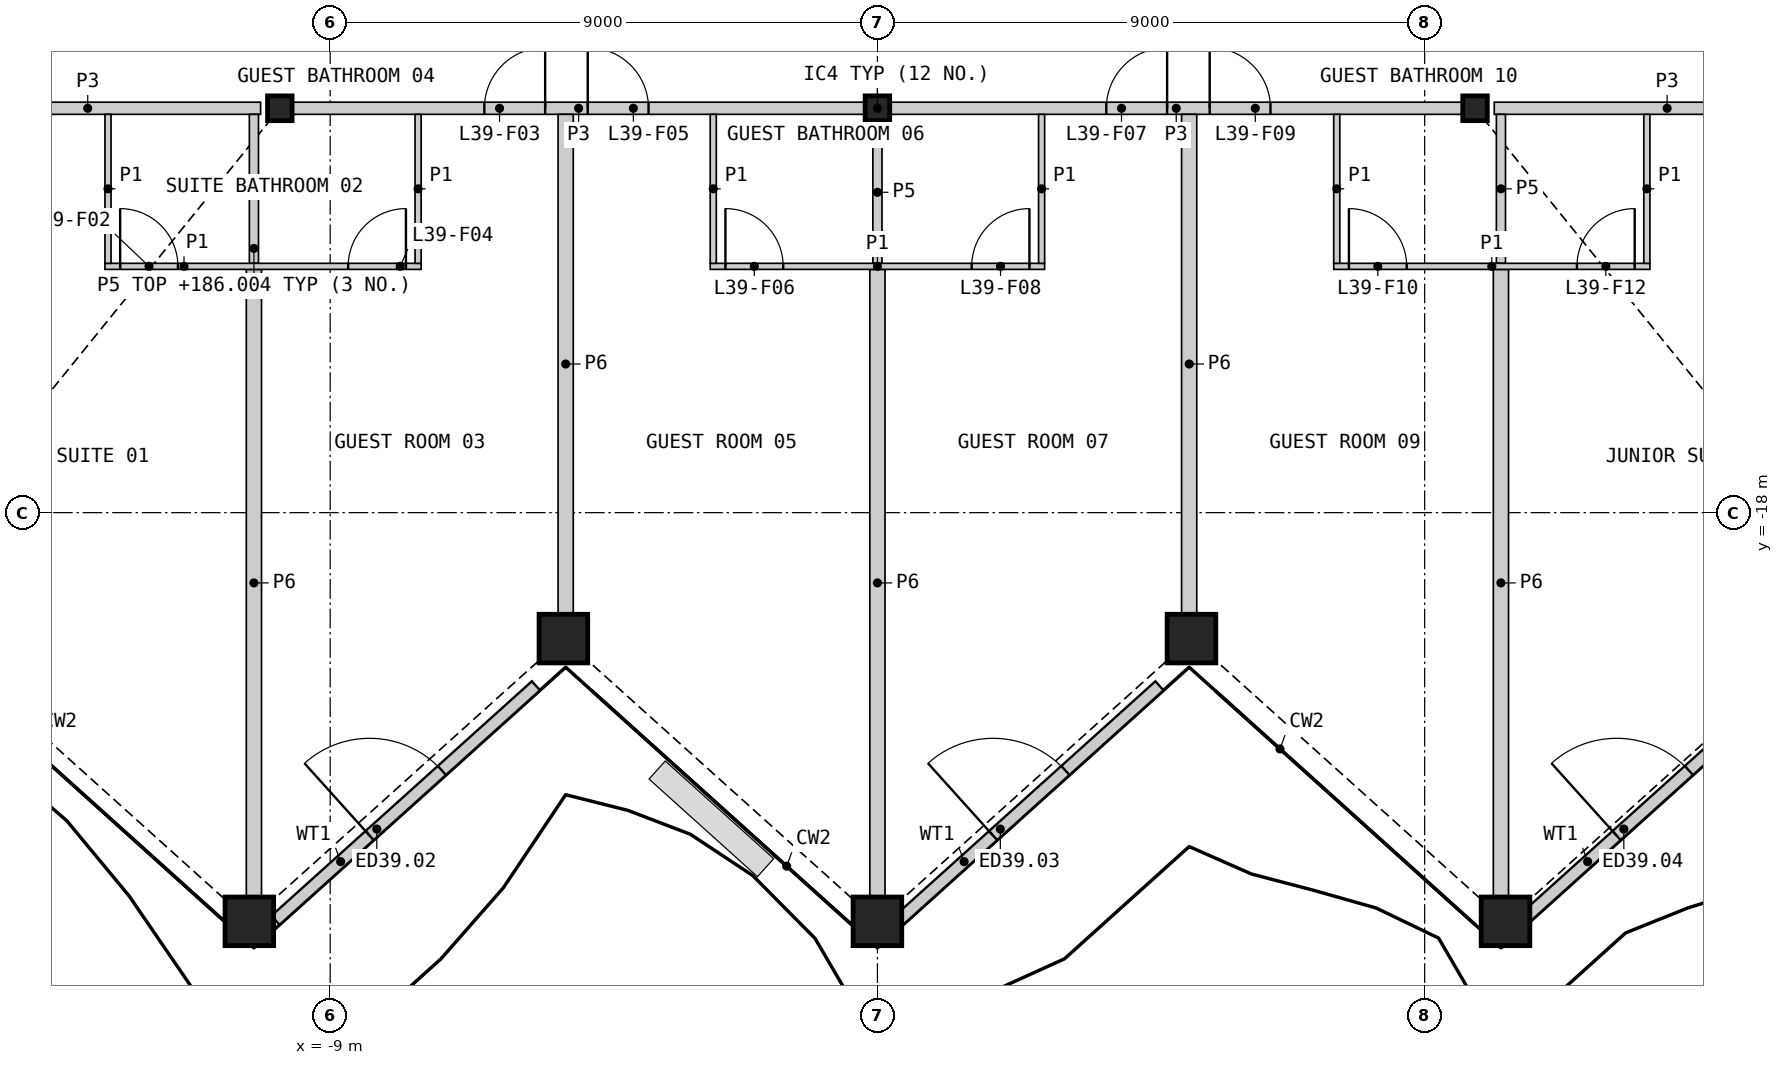
"""IFC4 building model, lengths in metres.
Left out: names, types, materials, properties, quantities, classifications, styles, units other than length and angle.
Written with IfcOpenShell. Run it as: python <this file> out.ifc"""

import sys

from ifc_helpers import new_model, si_unit, direction, frame, frame_2d, origin, origin_2d, place, context, subcontext, project, spatial, rectangle, hollow_rectangle, i_section, extrude, element, fill, save


model = new_model("IFC4")
c1 = context("Model", 3, precision=1e-05, world=origin(), true_north=direction((0.0, 1.0)))
c2 = subcontext(c1, "Body", "Model", "MODEL_VIEW")
j1 = project(units=[si_unit("LENGTHUNIT", "METRE"), si_unit("PLANEANGLEUNIT", "RADIAN")], contexts=[c1])
p1 = place(None, origin())
s1 = spatial("IfcSite", under=j1, at=p1, CompositionType="ELEMENT")
p2 = place(p1, origin())
s2 = spatial("IfcBuilding", under=s1, at=p2, CompositionType="ELEMENT")
p3 = place(p2, frame((0.0, 0.0, 183.6)))
s3 = spatial("IfcBuildingStorey", under=s2, at=p3, CompositionType="ELEMENT", Elevation=183.6)
for number, where, z_axis, x_axis in (
    (1, (-10.329, -24.722, 0.0), (0.0, 0.0, 1.0), (1.0, 0.0, 0.0)),
    (2, (-5.165, -20.071, 0.0), (0.0, 0.0, 1.0), (1.0, 0.0, 0.0)),
    (3, (0.0, -24.722, 0.0), (0.0, 0.0, 1.0), (1.0, 0.0, 0.0)),
    (4, (5.165, -20.071, 0.0), (0.0, 0.0, 1.0), (1.0, 0.0, 0.0)),
    (5, (10.329, -24.722, 0.0), (0.0, 0.0, 1.0), (1.0, 0.0, 0.0)),
):
    element("IfcColumn", number, at=place(p3, frame(where, z_axis=z_axis, x_axis=x_axis)), inside=s3, PredefinedType="COLUMN", context=c2, shape_type="SweptSolid", body=[
        extrude(hollow_rectangle(XDim=0.8, YDim=0.8, WallThickness=0.05, at=origin_2d()), origin(), (0.0, 0.0, 1.0), 3.6),
    ])
for number, where, z_axis, x_axis in (
    (6, (-9.828, -11.349, 0.0), (0.0, 0.0, 1.0), (1.0, 0.0, 0.0)),
    (7, (0.0, -11.349, 0.0), (0.0, 0.0, 1.0), (1.0, 0.0, 0.0)),
    (8, (9.828, -11.349, 0.0), (0.0, 0.0, 1.0), (1.0, 0.0, 0.0)),
):
    element("IfcColumn", number, at=place(p3, frame(where, z_axis=z_axis, x_axis=x_axis)), inside=s3, PredefinedType="COLUMN", context=c2, shape_type="SweptSolid", body=[
        extrude(i_section(OverallWidth=0.404, OverallDepth=0.407, WebThickness=0.027, FlangeThickness=0.044, at=origin_2d()), origin(), (0.0, 0.0, 1.0), 3.6),
    ])
p4 = place(p3, frame((-9.899, -24.704, 0.0), z_axis=(0.0, 0.0, 1.0), x_axis=(0.74312139518, 0.669156627424, 0.0)))
e9 = element("IfcWall", 9, at=p4, inside=s3, PredefinedType="SOLIDWALL", context=c2, shape_type="SweptSolid", body=[
    extrude(rectangle(XDim=5.763, YDim=0.2, at=frame_2d((2.882, 0.0))), origin(), (0.0, 0.0, 1.0), 2.701),
])
p5 = place(p4, frame((2.082, 0.0, 0.0)))
e10 = element("IfcOpeningElement", 10, at=p5, cuts=e9, PredefinedType="OPENING", context=c2, shape_type="SweptSolid", body=[
    extrude(rectangle(XDim=1.6, YDim=2.4, at=frame_2d((0.8, 1.2))), frame((0.0, 0.11, 0.0), z_axis=(0.0, -1.0, 0.0), x_axis=(1.0, 0.0, 0.0)), (0.0, 0.0, 1.0), 0.22),
])
p6 = place(p3, frame((0.355, -24.704, 0.0), z_axis=(0.0, 0.0, 1.0), x_axis=(0.743140362926, 0.669135562491, 0.0)))
e11 = element("IfcWall", 11, at=p6, inside=s3, PredefinedType="SOLIDWALL", context=c2, shape_type="SweptSolid", body=[
    extrude(rectangle(XDim=5.763, YDim=0.2, at=frame_2d((2.882, 0.0))), origin(), (0.0, 0.0, 1.0), 2.701),
])
p7 = place(p6, frame((2.082, 0.0, 0.0)))
e12 = element("IfcOpeningElement", 12, at=p7, cuts=e11, PredefinedType="OPENING", context=c2, shape_type="SweptSolid", body=[
    extrude(rectangle(XDim=1.6, YDim=2.4, at=frame_2d((0.8, 1.2))), frame((0.0, 0.11, 0.0), z_axis=(0.0, -1.0, 0.0), x_axis=(1.0, 0.0, 0.0)), (0.0, 0.0, 1.0), 0.22),
])
p8 = place(p3, frame((10.609, -24.704, 0.0), z_axis=(0.0, 0.0, 1.0), x_axis=(0.743140362926, 0.669135562491, 0.0)))
e13 = element("IfcWall", 13, at=p8, inside=s3, PredefinedType="SOLIDWALL", context=c2, shape_type="SweptSolid", body=[
    extrude(rectangle(XDim=5.763, YDim=0.2, at=frame_2d((2.882, 0.0))), origin(), (0.0, 0.0, 1.0), 2.701),
])
p9 = place(p8, frame((2.082, 0.0, 0.0)))
e14 = element("IfcOpeningElement", 14, at=p9, cuts=e13, PredefinedType="OPENING", context=c2, shape_type="SweptSolid", body=[
    extrude(rectangle(XDim=1.6, YDim=2.4, at=frame_2d((0.8, 1.2))), frame((0.0, 0.11, 0.0), z_axis=(0.0, -1.0, 0.0), x_axis=(1.0, 0.0, 0.0)), (0.0, 0.0, 1.0), 0.22),
])
for number, where, z_axis, x_axis in (
    (15, (-10.254, -24.312, 0.0), (0.0, 0.0, 1.0), (0.0, 1.0, 0.0)),
    (16, (0.0, -24.312, 0.0), (0.0, 0.0, 1.0), (0.0, 1.0, 0.0)),
    (17, (10.254, -24.312, 0.0), (0.0, 0.0, 1.0), (0.0, 1.0, 0.0)),
):
    element("IfcWall", number, at=place(p3, frame(where, z_axis=z_axis, x_axis=x_axis)), inside=s3, PredefinedType="PARTITIONING", context=c2, shape_type="SweptSolid", body=[
        extrude(rectangle(XDim=10.313, YDim=0.25, at=frame_2d((5.156, 0.0))), origin(), (0.0, 0.0, 1.0), 2.404),
    ])
p10 = place(p3, frame((-9.615, -11.349, 0.0), z_axis=(0.0, 0.0, 1.0), x_axis=(1.0, 0.0, 0.0)))
e18 = element("IfcWall", 18, at=p10, inside=s3, PredefinedType="PARTITIONING", context=c2, shape_type="SweptSolid", body=[
    extrude(rectangle(XDim=9.401, YDim=0.2, at=frame_2d((4.701, 0.0))), origin(), (0.0, 0.0, 1.0), 3.25),
])
p11 = place(p10, frame((3.15, 0.0, 0.0)))
e19 = element("IfcOpeningElement", 19, at=p11, cuts=e18, PredefinedType="OPENING", context=c2, shape_type="SweptSolid", body=[
    extrude(rectangle(XDim=1.0, YDim=2.1, at=frame_2d((0.5, 1.05))), frame((0.0, 0.11, 0.0), z_axis=(0.0, -1.0, 0.0), x_axis=(1.0, 0.0, 0.0)), (0.0, 0.0, 1.0), 0.22),
])
p12 = place(p10, frame((4.851, 0.0, 0.0)))
e20 = element("IfcOpeningElement", 20, at=p12, cuts=e18, PredefinedType="OPENING", context=c2, shape_type="SweptSolid", body=[
    extrude(rectangle(XDim=1.0, YDim=2.1, at=frame_2d((0.5, 1.05))), frame((0.0, 0.11, 0.0), z_axis=(0.0, -1.0, 0.0), x_axis=(1.0, 0.0, 0.0)), (0.0, 0.0, 1.0), 0.22),
])
p13 = place(p3, frame((0.214, -11.349, 0.0), z_axis=(0.0, 0.0, 1.0), x_axis=(1.0, 0.0, 0.0)))
e21 = element("IfcWall", 21, at=p13, inside=s3, PredefinedType="PARTITIONING", context=c2, shape_type="SweptSolid", body=[
    extrude(rectangle(XDim=9.401, YDim=0.2, at=frame_2d((4.701, 0.0))), origin(), (0.0, 0.0, 1.0), 3.25),
])
p14 = place(p13, frame((3.551, 0.0, 0.0)))
e22 = element("IfcOpeningElement", 22, at=p14, cuts=e21, PredefinedType="OPENING", context=c2, shape_type="SweptSolid", body=[
    extrude(rectangle(XDim=1.0, YDim=2.1, at=frame_2d((0.5, 1.05))), frame((0.0, 0.11, 0.0), z_axis=(0.0, -1.0, 0.0), x_axis=(1.0, 0.0, 0.0)), (0.0, 0.0, 1.0), 0.22),
])
p15 = place(p13, frame((5.251, 0.0, 0.0)))
e23 = element("IfcOpeningElement", 23, at=p15, cuts=e21, PredefinedType="OPENING", context=c2, shape_type="SweptSolid", body=[
    extrude(rectangle(XDim=1.0, YDim=2.1, at=frame_2d((0.5, 1.05))), frame((0.0, 0.11, 0.0), z_axis=(0.0, -1.0, 0.0), x_axis=(1.0, 0.0, 0.0)), (0.0, 0.0, 1.0), 0.22),
])
for number, where, z_axis, x_axis in (
    (24, (-5.127, -19.661, 0.0), (0.0, 0.0, 1.0), (0.0, 1.0, 0.0)),
    (25, (5.127, -19.661, 0.0), (0.0, 0.0, 1.0), (0.0, 1.0, 0.0)),
):
    element("IfcWall", number, at=place(p3, frame(where, z_axis=z_axis, x_axis=x_axis)), inside=s3, PredefinedType="PARTITIONING", context=c2, shape_type="SweptSolid", body=[
        extrude(rectangle(XDim=8.212, YDim=0.25, at=frame_2d((4.106, 0.0))), origin(), (0.0, 0.0, 1.0), 2.404),
    ])
p16 = place(p3, frame((-15.831, -11.349, 0.0), z_axis=(0.0, 0.0, 1.0), x_axis=(1.0, 0.0, 0.0)))
e26 = element("IfcWall", 26, at=p16, inside=s3, PredefinedType="PARTITIONING", context=c2, shape_type="SweptSolid", body=[
    extrude(rectangle(XDim=5.687, YDim=0.2, at=frame_2d((2.843, 0.0))), origin(), (0.0, 0.0, 1.0), 3.25),
])
p17 = place(p16, frame((0.352, 0.0, 0.0)))
e27 = element("IfcOpeningElement", 27, at=p17, cuts=e26, PredefinedType="OPENING", context=c2, shape_type="SweptSolid", body=[
    extrude(rectangle(XDim=1.1, YDim=2.1, at=frame_2d((0.55, 1.05))), frame((0.0, 0.11, 0.0), z_axis=(0.0, -1.0, 0.0), x_axis=(1.0, 0.0, 0.0)), (0.0, 0.0, 1.0), 0.22),
])
p18 = place(p3, frame((10.144, -11.349, 0.0), z_axis=(0.0, 0.0, 1.0), x_axis=(1.0, 0.0, 0.0)))
e28 = element("IfcWall", 28, at=p18, inside=s3, PredefinedType="PARTITIONING", context=c2, shape_type="SweptSolid", body=[
    extrude(rectangle(XDim=5.687, YDim=0.2, at=frame_2d((2.843, 0.0))), origin(), (0.0, 0.0, 1.0), 3.25),
])
p19 = place(p18, frame((4.235, 0.0, 0.0)))
e29 = element("IfcOpeningElement", 29, at=p19, cuts=e28, PredefinedType="OPENING", context=c2, shape_type="SweptSolid", body=[
    extrude(rectangle(XDim=1.1, YDim=2.1, at=frame_2d((0.55, 1.05))), frame((0.0, 0.11, 0.0), z_axis=(0.0, -1.0, 0.0), x_axis=(1.0, 0.0, 0.0)), (0.0, 0.0, 1.0), 0.22),
])
for number, where, z_axis, x_axis in (
    (30, (-10.254, -13.899, 0.0), (0.0, 0.0, 1.0), (0.0, 1.0, 0.0)),
    (31, (10.254, -13.899, 0.0), (0.0, 0.0, 1.0), (0.0, 1.0, 0.0)),
):
    element("IfcWall", number, at=place(p3, frame(where, z_axis=z_axis, x_axis=x_axis)), inside=s3, PredefinedType="PLUMBINGWALL", context=c2, shape_type="SweptSolid", body=[
        extrude(rectangle(XDim=2.45, YDim=0.15, at=frame_2d((1.225, 0.0))), origin(), (0.0, 0.0, 1.0), 2.404),
    ])
p20 = place(p3, frame((0.0, -13.899, 0.0), z_axis=(0.0, 0.0, 1.0), x_axis=(0.0, 1.0, 0.0)))
e32 = element("IfcWall", 32, at=p20, inside=s3, PredefinedType="PLUMBINGWALL", context=c2, shape_type="SweptSolid", body=[
    extrude(rectangle(XDim=2.336, YDim=0.15, at=frame_2d((1.168, 0.0))), origin(), (0.0, 0.0, 1.0), 2.404),
])
p21 = place(p3, frame((-2.75, -13.949, 0.0), z_axis=(0.0, 0.0, 1.0), x_axis=(1.0, 0.0, 0.0)))
e33 = element("IfcWall", 33, at=p21, inside=s3, PredefinedType="PARTITIONING", context=c2, shape_type="SweptSolid", body=[
    extrude(rectangle(XDim=5.5, YDim=0.1, at=frame_2d((2.75, 0.0))), origin(), (0.0, 0.0, 1.0), 2.404),
])
p22 = place(p21, frame((0.25, 0.0, 0.0)))
e34 = element("IfcOpeningElement", 34, at=p22, cuts=e33, PredefinedType="OPENING", context=c2, shape_type="SweptSolid", body=[
    extrude(rectangle(XDim=0.95, YDim=2.1, at=frame_2d((0.475, 1.05))), frame((0.0, 0.06, 0.0), z_axis=(0.0, -1.0, 0.0), x_axis=(1.0, 0.0, 0.0)), (0.0, 0.0, 1.0), 0.12),
])
p23 = place(p21, frame((4.3, 0.0, 0.0)))
e35 = element("IfcOpeningElement", 35, at=p23, cuts=e33, PredefinedType="OPENING", context=c2, shape_type="SweptSolid", body=[
    extrude(rectangle(XDim=0.95, YDim=2.1, at=frame_2d((0.475, 1.05))), frame((0.0, 0.06, 0.0), z_axis=(0.0, -1.0, 0.0), x_axis=(1.0, 0.0, 0.0)), (0.0, 0.0, 1.0), 0.12),
])
p24 = place(p3, frame((-12.704, -13.949, 0.0), z_axis=(0.0, 0.0, 1.0), x_axis=(1.0, 0.0, 0.0)))
e36 = element("IfcWall", 36, at=p24, inside=s3, PredefinedType="PARTITIONING", context=c2, shape_type="SweptSolid", body=[
    extrude(rectangle(XDim=5.2, YDim=0.1, at=frame_2d((2.6, 0.0))), origin(), (0.0, 0.0, 1.0), 2.404),
])
p25 = place(p24, frame((0.25, 0.0, 0.0)))
e37 = element("IfcOpeningElement", 37, at=p25, cuts=e36, PredefinedType="OPENING", context=c2, shape_type="SweptSolid", body=[
    extrude(rectangle(XDim=0.95, YDim=2.1, at=frame_2d((0.475, 1.05))), frame((0.0, 0.06, 0.0), z_axis=(0.0, -1.0, 0.0), x_axis=(1.0, 0.0, 0.0)), (0.0, 0.0, 1.0), 0.12),
])
p26 = place(p24, frame((4.0, 0.0, 0.0)))
e38 = element("IfcOpeningElement", 38, at=p26, cuts=e36, PredefinedType="OPENING", context=c2, shape_type="SweptSolid", body=[
    extrude(rectangle(XDim=0.95, YDim=2.1, at=frame_2d((0.475, 1.05))), frame((0.0, 0.06, 0.0), z_axis=(0.0, -1.0, 0.0), x_axis=(1.0, 0.0, 0.0)), (0.0, 0.0, 1.0), 0.12),
])
p27 = place(p3, frame((7.504, -13.949, 0.0), z_axis=(0.0, 0.0, 1.0), x_axis=(1.0, 0.0, 0.0)))
e39 = element("IfcWall", 39, at=p27, inside=s3, PredefinedType="PARTITIONING", context=c2, shape_type="SweptSolid", body=[
    extrude(rectangle(XDim=5.2, YDim=0.1, at=frame_2d((2.6, 0.0))), origin(), (0.0, 0.0, 1.0), 2.404),
])
p28 = place(p27, frame((0.25, 0.0, 0.0)))
e40 = element("IfcOpeningElement", 40, at=p28, cuts=e39, PredefinedType="OPENING", context=c2, shape_type="SweptSolid", body=[
    extrude(rectangle(XDim=0.95, YDim=2.1, at=frame_2d((0.475, 1.05))), frame((0.0, 0.06, 0.0), z_axis=(0.0, -1.0, 0.0), x_axis=(1.0, 0.0, 0.0)), (0.0, 0.0, 1.0), 0.12),
])
p29 = place(p27, frame((4.0, 0.0, 0.0)))
e41 = element("IfcOpeningElement", 41, at=p29, cuts=e39, PredefinedType="OPENING", context=c2, shape_type="SweptSolid", body=[
    extrude(rectangle(XDim=0.95, YDim=2.1, at=frame_2d((0.475, 1.05))), frame((0.0, 0.06, 0.0), z_axis=(0.0, -1.0, 0.0), x_axis=(1.0, 0.0, 0.0)), (0.0, 0.0, 1.0), 0.12),
])
for number, where, z_axis, x_axis in (
    (42, (-12.654, -13.899, 0.0), (0.0, 0.0, 1.0), (0.0, 1.0, 0.0)),
    (43, (-7.554, -13.899, 0.0), (0.0, 0.0, 1.0), (0.0, 1.0, 0.0)),
    (44, (-2.7, -13.899, 0.0), (0.0, 0.0, 1.0), (0.0, 1.0, 0.0)),
    (45, (2.7, -13.899, 0.0), (0.0, 0.0, 1.0), (0.0, 1.0, 0.0)),
    (46, (7.554, -13.899, 0.0), (0.0, 0.0, 1.0), (0.0, 1.0, 0.0)),
    (47, (12.654, -13.899, 0.0), (0.0, 0.0, 1.0), (0.0, 1.0, 0.0)),
):
    element("IfcWall", number, at=place(p3, frame(where, z_axis=z_axis, x_axis=x_axis)), inside=s3, PredefinedType="PARTITIONING", context=c2, shape_type="SweptSolid", body=[
        extrude(rectangle(XDim=2.45, YDim=0.1, at=frame_2d((1.225, 0.0))), origin(), (0.0, 0.0, 1.0), 2.404),
    ])
p30 = place(p5, origin())
e48 = element("IfcDoor", 48, at=p30, inside=s3, OperationType="DOUBLE_DOOR_SINGLE_SWING", PredefinedType="DOOR", context=c2, shape_type="SweptSolid", body=[
    extrude(rectangle(XDim=1.6, YDim=2.4, at=frame_2d((0.8, 1.2))), frame((0.0, 0.025, 0.0), z_axis=(0.0, -1.0, 0.0), x_axis=(1.0, 0.0, 0.0)), (0.0, 0.0, 1.0), 0.05),
])
fill(e10, e48)
p31 = place(p7, origin())
e49 = element("IfcDoor", 49, at=p31, inside=s3, OperationType="DOUBLE_DOOR_SINGLE_SWING", PredefinedType="DOOR", context=c2, shape_type="SweptSolid", body=[
    extrude(rectangle(XDim=1.6, YDim=2.4, at=frame_2d((0.8, 1.2))), frame((0.0, 0.025, 0.0), z_axis=(0.0, -1.0, 0.0), x_axis=(1.0, 0.0, 0.0)), (0.0, 0.0, 1.0), 0.05),
])
fill(e12, e49)
p32 = place(p9, origin())
e50 = element("IfcDoor", 50, at=p32, inside=s3, OperationType="DOUBLE_DOOR_SINGLE_SWING", PredefinedType="DOOR", context=c2, shape_type="SweptSolid", body=[
    extrude(rectangle(XDim=1.6, YDim=2.4, at=frame_2d((0.8, 1.2))), frame((0.0, 0.025, 0.0), z_axis=(0.0, -1.0, 0.0), x_axis=(1.0, 0.0, 0.0)), (0.0, 0.0, 1.0), 0.05),
])
fill(e14, e50)
p33 = place(p25, origin())
e51 = element("IfcDoor", 51, at=p33, inside=s3, OperationType="SINGLE_SWING_LEFT", PredefinedType="DOOR", context=c2, shape_type="SweptSolid", body=[
    extrude(rectangle(XDim=0.95, YDim=2.1, at=frame_2d((0.475, 1.05))), frame((0.0, 0.025, 0.0), z_axis=(0.0, -1.0, 0.0), x_axis=(1.0, 0.0, 0.0)), (0.0, 0.0, 1.0), 0.05),
])
fill(e37, e51)
p34 = place(p11, origin())
e52 = element("IfcDoor", 52, at=p34, inside=s3, OperationType="SINGLE_SWING_RIGHT", PredefinedType="DOOR", context=c2, shape_type="SweptSolid", body=[
    extrude(rectangle(XDim=1.0, YDim=2.1, at=frame_2d((0.5, 1.05))), frame((0.0, 0.025, 0.0), z_axis=(0.0, -1.0, 0.0), x_axis=(1.0, 0.0, 0.0)), (0.0, 0.0, 1.0), 0.05),
])
fill(e19, e52)
p35 = place(p26, origin())
e53 = element("IfcDoor", 53, at=p35, inside=s3, OperationType="SINGLE_SWING_RIGHT", PredefinedType="DOOR", context=c2, shape_type="SweptSolid", body=[
    extrude(rectangle(XDim=0.95, YDim=2.1, at=frame_2d((0.475, 1.05))), frame((0.0, 0.025, 0.0), z_axis=(0.0, -1.0, 0.0), x_axis=(1.0, 0.0, 0.0)), (0.0, 0.0, 1.0), 0.05),
])
fill(e38, e53)
p36 = place(p12, origin())
e54 = element("IfcDoor", 54, at=p36, inside=s3, OperationType="SINGLE_SWING_LEFT", PredefinedType="DOOR", context=c2, shape_type="SweptSolid", body=[
    extrude(rectangle(XDim=1.0, YDim=2.1, at=frame_2d((0.5, 1.05))), frame((0.0, 0.025, 0.0), z_axis=(0.0, -1.0, 0.0), x_axis=(1.0, 0.0, 0.0)), (0.0, 0.0, 1.0), 0.05),
])
fill(e20, e54)
p37 = place(p22, origin())
e55 = element("IfcDoor", 55, at=p37, inside=s3, OperationType="SINGLE_SWING_LEFT", PredefinedType="DOOR", context=c2, shape_type="SweptSolid", body=[
    extrude(rectangle(XDim=0.95, YDim=2.1, at=frame_2d((0.475, 1.05))), frame((0.0, 0.025, 0.0), z_axis=(0.0, -1.0, 0.0), x_axis=(1.0, 0.0, 0.0)), (0.0, 0.0, 1.0), 0.05),
])
fill(e34, e55)
p38 = place(p14, origin())
e56 = element("IfcDoor", 56, at=p38, inside=s3, OperationType="SINGLE_SWING_RIGHT", PredefinedType="DOOR", context=c2, shape_type="SweptSolid", body=[
    extrude(rectangle(XDim=1.0, YDim=2.1, at=frame_2d((0.5, 1.05))), frame((0.0, 0.025, 0.0), z_axis=(0.0, -1.0, 0.0), x_axis=(1.0, 0.0, 0.0)), (0.0, 0.0, 1.0), 0.05),
])
fill(e22, e56)
p39 = place(p23, origin())
e57 = element("IfcDoor", 57, at=p39, inside=s3, OperationType="SINGLE_SWING_RIGHT", PredefinedType="DOOR", context=c2, shape_type="SweptSolid", body=[
    extrude(rectangle(XDim=0.95, YDim=2.1, at=frame_2d((0.475, 1.05))), frame((0.0, 0.025, 0.0), z_axis=(0.0, -1.0, 0.0), x_axis=(1.0, 0.0, 0.0)), (0.0, 0.0, 1.0), 0.05),
])
fill(e35, e57)
p40 = place(p15, origin())
e58 = element("IfcDoor", 58, at=p40, inside=s3, OperationType="SINGLE_SWING_LEFT", PredefinedType="DOOR", context=c2, shape_type="SweptSolid", body=[
    extrude(rectangle(XDim=1.0, YDim=2.1, at=frame_2d((0.5, 1.05))), frame((0.0, 0.025, 0.0), z_axis=(0.0, -1.0, 0.0), x_axis=(1.0, 0.0, 0.0)), (0.0, 0.0, 1.0), 0.05),
])
fill(e23, e58)
p41 = place(p28, origin())
e59 = element("IfcDoor", 59, at=p41, inside=s3, OperationType="SINGLE_SWING_LEFT", PredefinedType="DOOR", context=c2, shape_type="SweptSolid", body=[
    extrude(rectangle(XDim=0.95, YDim=2.1, at=frame_2d((0.475, 1.05))), frame((0.0, 0.025, 0.0), z_axis=(0.0, -1.0, 0.0), x_axis=(1.0, 0.0, 0.0)), (0.0, 0.0, 1.0), 0.05),
])
fill(e40, e59)
p42 = place(p29, origin())
e60 = element("IfcDoor", 60, at=p42, inside=s3, OperationType="SINGLE_SWING_RIGHT", PredefinedType="DOOR", context=c2, shape_type="SweptSolid", body=[
    extrude(rectangle(XDim=0.95, YDim=2.1, at=frame_2d((0.475, 1.05))), frame((0.0, 0.025, 0.0), z_axis=(0.0, -1.0, 0.0), x_axis=(1.0, 0.0, 0.0)), (0.0, 0.0, 1.0), 0.05),
])
fill(e41, e60)
save(model, sys.argv[1])
